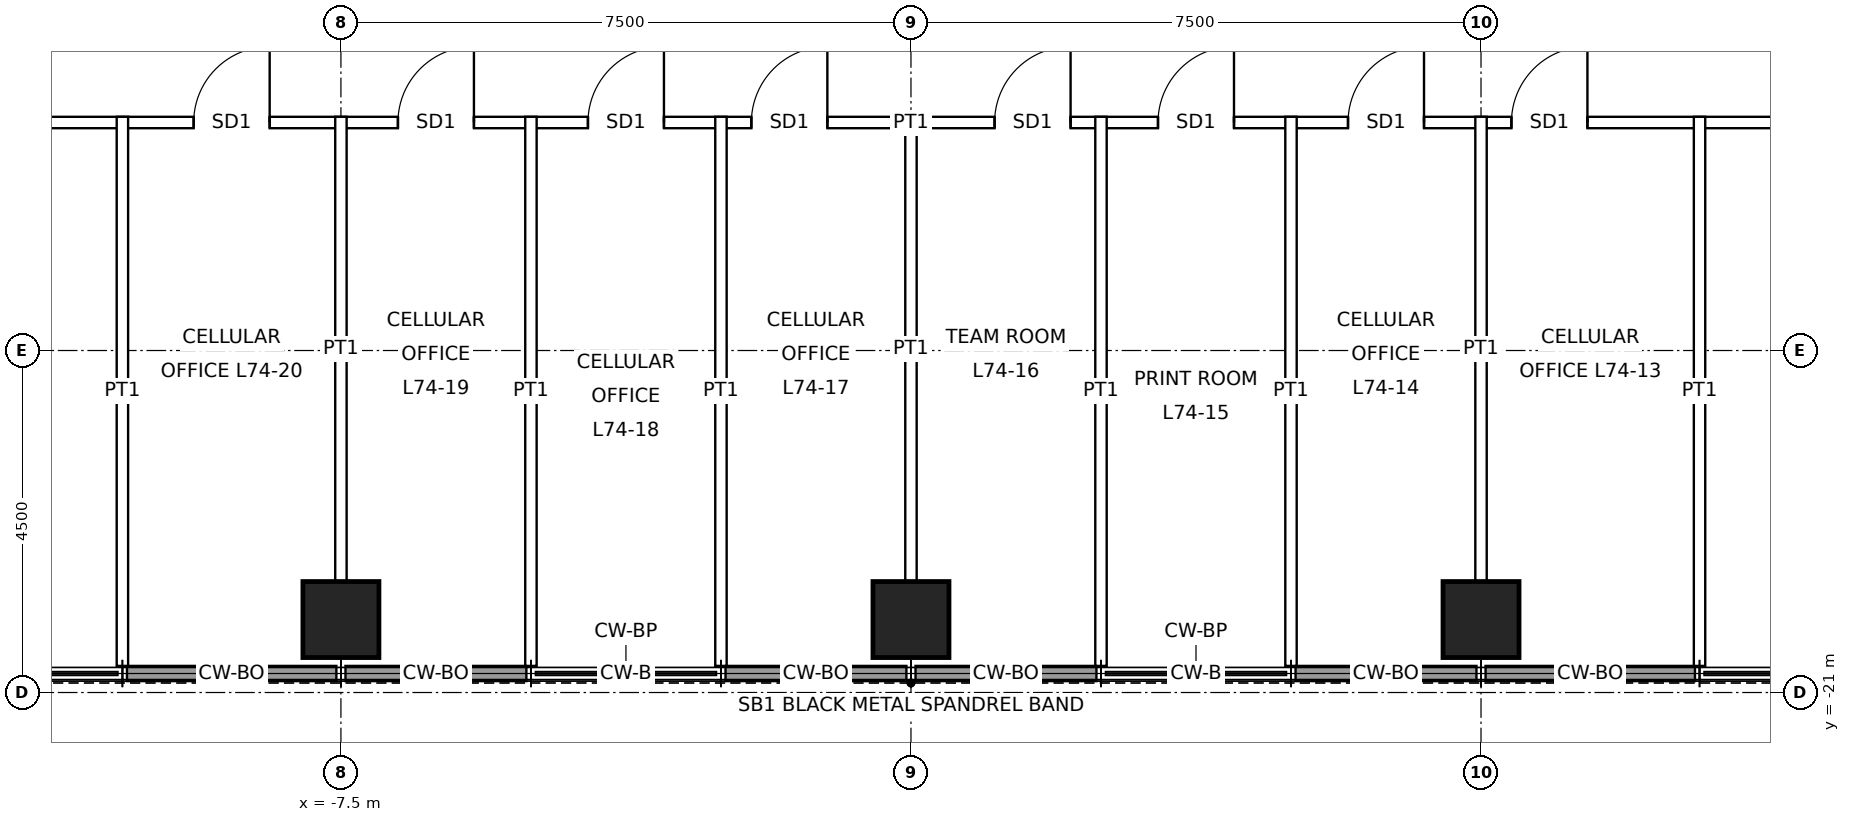
"""IFC4 building model, lengths in metres.
Left out: names, types, materials, properties, quantities, classifications, styles, units other than length and angle.
Written with IfcOpenShell. Run it as: python <this file> out.ifc"""

import sys

from ifc_helpers import new_model, si_unit, direction, frame, frame_2d, origin, origin_2d, place, context, subcontext, project, spatial, rectangle, hollow_rectangle, extrude, element, fill, save


model = new_model("IFC4")
c1 = context("Model", 3, precision=1e-05, world=origin(), true_north=direction((0.0, 1.0)))
c2 = subcontext(c1, "Body", "Model", "MODEL_VIEW")
j1 = project(units=[si_unit("LENGTHUNIT", "METRE"), si_unit("PLANEANGLEUNIT", "RADIAN")], contexts=[c1])
p1 = place(None, origin())
s1 = spatial("IfcSite", under=j1, at=p1, CompositionType="ELEMENT")
p2 = place(p1, origin())
s2 = spatial("IfcBuilding", under=s1, at=p2, CompositionType="ELEMENT")
p3 = place(p2, frame((0.0, 0.0, 331.9)))
s3 = spatial("IfcBuildingStorey", under=s2, at=p3, CompositionType="ELEMENT", Elevation=331.9)
for number, where, z_axis, x_axis in (
    (1, (7.5, -20.04, 0.0), (0.0, 0.0, 1.0), (1.0, 0.0, 0.0)),
    (2, (0.0, -20.04, 0.0), (0.0, 0.0, 1.0), (1.0, 0.0, 0.0)),
    (3, (-7.5, -20.04, 0.0), (0.0, 0.0, 1.0), (1.0, 0.0, 0.0)),
):
    element("IfcColumn", number, at=place(p3, frame(where, z_axis=z_axis, x_axis=x_axis)), inside=s3, PredefinedType="COLUMN", context=c2, shape_type="SweptSolid", body=[
        extrude(hollow_rectangle(XDim=1.0, YDim=1.0, WallThickness=0.075, at=origin_2d()), origin(), (0.0, 0.0, 1.0), 4.0),
    ])
p4 = place(p3, frame((10.315, -20.75, 0.0), z_axis=(0.0, 0.0, 1.0), x_axis=(-1.0, 0.0, 0.0)))
e4 = element("IfcWall", 4, at=p4, inside=s3, PredefinedType="SOLIDWALL", context=c2, shape_type="SweptSolid", body=[
    extrude(rectangle(XDim=2.755, YDim=0.2, at=frame_2d((1.377, 0.0))), origin(), (0.0, 0.0, 1.0), 3.8),
])
for number, where, z_axis, x_axis in (
    (5, (7.44, -20.75, 0.0), (0.0, 0.0, 1.0), (-1.0, 0.0, 0.0)),
    (6, (2.44, -20.75, 0.0), (0.0, 0.0, 1.0), (-1.0, 0.0, 0.0)),
    (7, (-0.06, -20.75, 0.0), (0.0, 0.0, 1.0), (-1.0, 0.0, 0.0)),
    (8, (-5.06, -20.75, 0.0), (0.0, 0.0, 1.0), (-1.0, 0.0, 0.0)),
):
    element("IfcWall", number, at=place(p3, frame(where, z_axis=z_axis, x_axis=x_axis)), inside=s3, PredefinedType="SOLIDWALL", context=c2, shape_type="SweptSolid", body=[
        extrude(rectangle(XDim=2.38, YDim=0.2, at=frame_2d((1.19, 0.0))), origin(), (0.0, 0.0, 1.0), 3.8),
    ])
p5 = place(p3, frame((-7.56, -20.75, 0.0), z_axis=(0.0, 0.0, 1.0), x_axis=(-1.0, 0.0, 0.0)))
e9 = element("IfcWall", 9, at=p5, inside=s3, PredefinedType="SOLIDWALL", context=c2, shape_type="SweptSolid", body=[
    extrude(rectangle(XDim=2.755, YDim=0.2, at=frame_2d((1.377, 0.0))), origin(), (0.0, 0.0, 1.0), 3.8),
])
p6 = place(p3, frame((-13.575, -13.5, 0.0), z_axis=(0.0, 0.0, 1.0), x_axis=(1.0, 0.0, 0.0)))
e10 = element("IfcWall", 10, at=p6, inside=s3, PredefinedType="PARTITIONING", context=c2, shape_type="SweptSolid", body=[
    extrude(rectangle(XDim=27.15, YDim=0.15, at=frame_2d((13.575, 0.0))), origin(), (0.0, 0.0, 1.0), 3.8),
])
p7 = place(p6, frame((21.475, 0.0, 0.0)))
e11 = element("IfcOpeningElement", 11, at=p7, cuts=e10, PredefinedType="OPENING", context=c2, shape_type="SweptSolid", body=[
    extrude(rectangle(XDim=1.0, YDim=2.4, at=frame_2d((0.5, 1.2))), frame((0.0, 0.085, 0.0), z_axis=(0.0, -1.0, 0.0), x_axis=(1.0, 0.0, 0.0)), (0.0, 0.0, 1.0), 0.17),
])
p8 = place(p6, frame((19.325, 0.0, 0.0)))
e12 = element("IfcOpeningElement", 12, at=p8, cuts=e10, PredefinedType="OPENING", context=c2, shape_type="SweptSolid", body=[
    extrude(rectangle(XDim=1.0, YDim=2.4, at=frame_2d((0.5, 1.2))), frame((0.0, 0.085, 0.0), z_axis=(0.0, -1.0, 0.0), x_axis=(1.0, 0.0, 0.0)), (0.0, 0.0, 1.0), 0.17),
])
p9 = place(p6, frame((16.825, 0.0, 0.0)))
e13 = element("IfcOpeningElement", 13, at=p9, cuts=e10, PredefinedType="OPENING", context=c2, shape_type="SweptSolid", body=[
    extrude(rectangle(XDim=1.0, YDim=2.4, at=frame_2d((0.5, 1.2))), frame((0.0, 0.085, 0.0), z_axis=(0.0, -1.0, 0.0), x_axis=(1.0, 0.0, 0.0)), (0.0, 0.0, 1.0), 0.17),
])
p10 = place(p6, frame((14.675, 0.0, 0.0)))
e14 = element("IfcOpeningElement", 14, at=p10, cuts=e10, PredefinedType="OPENING", context=c2, shape_type="SweptSolid", body=[
    extrude(rectangle(XDim=1.0, YDim=2.4, at=frame_2d((0.5, 1.2))), frame((0.0, 0.085, 0.0), z_axis=(0.0, -1.0, 0.0), x_axis=(1.0, 0.0, 0.0)), (0.0, 0.0, 1.0), 0.17),
])
p11 = place(p6, frame((11.475, 0.0, 0.0)))
e15 = element("IfcOpeningElement", 15, at=p11, cuts=e10, PredefinedType="OPENING", context=c2, shape_type="SweptSolid", body=[
    extrude(rectangle(XDim=1.0, YDim=2.4, at=frame_2d((0.5, 1.2))), frame((0.0, 0.085, 0.0), z_axis=(0.0, -1.0, 0.0), x_axis=(1.0, 0.0, 0.0)), (0.0, 0.0, 1.0), 0.17),
])
p12 = place(p6, frame((9.325, 0.0, 0.0)))
e16 = element("IfcOpeningElement", 16, at=p12, cuts=e10, PredefinedType="OPENING", context=c2, shape_type="SweptSolid", body=[
    extrude(rectangle(XDim=1.0, YDim=2.4, at=frame_2d((0.5, 1.2))), frame((0.0, 0.085, 0.0), z_axis=(0.0, -1.0, 0.0), x_axis=(1.0, 0.0, 0.0)), (0.0, 0.0, 1.0), 0.17),
])
p13 = place(p6, frame((6.825, 0.0, 0.0)))
e17 = element("IfcOpeningElement", 17, at=p13, cuts=e10, PredefinedType="OPENING", context=c2, shape_type="SweptSolid", body=[
    extrude(rectangle(XDim=1.0, YDim=2.4, at=frame_2d((0.5, 1.2))), frame((0.0, 0.085, 0.0), z_axis=(0.0, -1.0, 0.0), x_axis=(1.0, 0.0, 0.0)), (0.0, 0.0, 1.0), 0.17),
])
p14 = place(p6, frame((4.137, 0.0, 0.0)))
e18 = element("IfcOpeningElement", 18, at=p14, cuts=e10, PredefinedType="OPENING", context=c2, shape_type="SweptSolid", body=[
    extrude(rectangle(XDim=1.0, YDim=2.4, at=frame_2d((0.5, 1.2))), frame((0.0, 0.085, 0.0), z_axis=(0.0, -1.0, 0.0), x_axis=(1.0, 0.0, 0.0)), (0.0, 0.0, 1.0), 0.17),
])
p15 = place(p6, frame((25.278, 0.0, 0.0)))
e19 = element("IfcOpeningElement", 19, at=p15, cuts=e10, PredefinedType="OPENING", context=c2, shape_type="SweptSolid", body=[
    extrude(rectangle(XDim=1.0, YDim=2.4, at=frame_2d((0.5, 1.2))), frame((0.0, 0.085, 0.0), z_axis=(0.0, -1.0, 0.0), x_axis=(1.0, 0.0, 0.0)), (0.0, 0.0, 1.0), 0.17),
])
p16 = place(p6, frame((1.137, 0.0, 0.0)))
e20 = element("IfcOpeningElement", 20, at=p16, cuts=e10, PredefinedType="OPENING", context=c2, shape_type="SweptSolid", body=[
    extrude(rectangle(XDim=1.0, YDim=2.4, at=frame_2d((0.5, 1.2))), frame((0.0, 0.085, 0.0), z_axis=(0.0, -1.0, 0.0), x_axis=(1.0, 0.0, 0.0)), (0.0, 0.0, 1.0), 0.17),
])
p17 = place(p3, frame((-10.375, -20.65, 0.0), z_axis=(0.0, 0.0, 1.0), x_axis=(0.0, 1.0, 0.0)))
e21 = element("IfcWall", 21, at=p17, inside=s3, PredefinedType="PARTITIONING", context=c2, shape_type="SweptSolid", body=[
    extrude(rectangle(XDim=7.225, YDim=0.15, at=frame_2d((3.612, 0.0))), origin(), (0.0, 0.0, 1.0), 3.8),
])
p18 = place(p3, frame((-7.5, -19.54, 0.0), z_axis=(0.0, 0.0, 1.0), x_axis=(0.0, 1.0, 0.0)))
e22 = element("IfcWall", 22, at=p18, inside=s3, PredefinedType="PARTITIONING", context=c2, shape_type="SweptSolid", body=[
    extrude(rectangle(XDim=6.115, YDim=0.15, at=frame_2d((3.058, 0.0))), origin(), (0.0, 0.0, 1.0), 2.769),
])
for number, where, z_axis, x_axis in (
    (23, (-5.0, -20.65, 0.0), (0.0, 0.0, 1.0), (0.0, 1.0, 0.0)),
    (24, (-2.5, -20.65, 0.0), (0.0, 0.0, 1.0), (0.0, 1.0, 0.0)),
):
    element("IfcWall", number, at=place(p3, frame(where, z_axis=z_axis, x_axis=x_axis)), inside=s3, PredefinedType="PARTITIONING", context=c2, shape_type="SweptSolid", body=[
        extrude(rectangle(XDim=7.225, YDim=0.15, at=frame_2d((3.612, 0.0))), origin(), (0.0, 0.0, 1.0), 3.8),
    ])
p19 = place(p3, frame((0.0, -19.54, 0.0), z_axis=(0.0, 0.0, 1.0), x_axis=(0.0, 1.0, 0.0)))
e25 = element("IfcWall", 25, at=p19, inside=s3, PredefinedType="PARTITIONING", context=c2, shape_type="SweptSolid", body=[
    extrude(rectangle(XDim=6.115, YDim=0.15, at=frame_2d((3.058, 0.0))), origin(), (0.0, 0.0, 1.0), 2.769),
])
for number, where, z_axis, x_axis in (
    (26, (2.5, -20.65, 0.0), (0.0, 0.0, 1.0), (0.0, 1.0, 0.0)),
    (27, (5.0, -20.65, 0.0), (0.0, 0.0, 1.0), (0.0, 1.0, 0.0)),
):
    element("IfcWall", number, at=place(p3, frame(where, z_axis=z_axis, x_axis=x_axis)), inside=s3, PredefinedType="PARTITIONING", context=c2, shape_type="SweptSolid", body=[
        extrude(rectangle(XDim=7.225, YDim=0.15, at=frame_2d((3.612, 0.0))), origin(), (0.0, 0.0, 1.0), 3.8),
    ])
p20 = place(p3, frame((7.5, -19.54, 0.0), z_axis=(0.0, 0.0, 1.0), x_axis=(0.0, 1.0, 0.0)))
e28 = element("IfcWall", 28, at=p20, inside=s3, PredefinedType="PARTITIONING", context=c2, shape_type="SweptSolid", body=[
    extrude(rectangle(XDim=6.115, YDim=0.15, at=frame_2d((3.058, 0.0))), origin(), (0.0, 0.0, 1.0), 2.769),
])
p21 = place(p3, frame((10.375, -20.65, 0.0), z_axis=(0.0, 0.0, 1.0), x_axis=(0.0, 1.0, 0.0)))
e29 = element("IfcWall", 29, at=p21, inside=s3, PredefinedType="PARTITIONING", context=c2, shape_type="SweptSolid", body=[
    extrude(rectangle(XDim=7.225, YDim=0.15, at=frame_2d((3.612, 0.0))), origin(), (0.0, 0.0, 1.0), 3.8),
])
p22 = place(p7, origin())
e30 = element("IfcDoor", 30, at=p22, inside=s3, OperationType="SINGLE_SWING_RIGHT", PredefinedType="DOOR", context=c2, shape_type="SweptSolid", body=[
    extrude(rectangle(XDim=1.0, YDim=2.4, at=frame_2d((0.5, 1.2))), frame((0.0, 0.025, 0.0), z_axis=(0.0, -1.0, 0.0), x_axis=(1.0, 0.0, 0.0)), (0.0, 0.0, 1.0), 0.05),
])
fill(e11, e30)
p23 = place(p8, origin())
e31 = element("IfcDoor", 31, at=p23, inside=s3, OperationType="SINGLE_SWING_RIGHT", PredefinedType="DOOR", context=c2, shape_type="SweptSolid", body=[
    extrude(rectangle(XDim=1.0, YDim=2.4, at=frame_2d((0.5, 1.2))), frame((0.0, 0.025, 0.0), z_axis=(0.0, -1.0, 0.0), x_axis=(1.0, 0.0, 0.0)), (0.0, 0.0, 1.0), 0.05),
])
fill(e12, e31)
p24 = place(p9, origin())
e32 = element("IfcDoor", 32, at=p24, inside=s3, OperationType="SINGLE_SWING_RIGHT", PredefinedType="DOOR", context=c2, shape_type="SweptSolid", body=[
    extrude(rectangle(XDim=1.0, YDim=2.4, at=frame_2d((0.5, 1.2))), frame((0.0, 0.025, 0.0), z_axis=(0.0, -1.0, 0.0), x_axis=(1.0, 0.0, 0.0)), (0.0, 0.0, 1.0), 0.05),
])
fill(e13, e32)
p25 = place(p10, origin())
e33 = element("IfcDoor", 33, at=p25, inside=s3, OperationType="SINGLE_SWING_RIGHT", PredefinedType="DOOR", context=c2, shape_type="SweptSolid", body=[
    extrude(rectangle(XDim=1.0, YDim=2.4, at=frame_2d((0.5, 1.2))), frame((0.0, 0.025, 0.0), z_axis=(0.0, -1.0, 0.0), x_axis=(1.0, 0.0, 0.0)), (0.0, 0.0, 1.0), 0.05),
])
fill(e14, e33)
p26 = place(p11, origin())
e34 = element("IfcDoor", 34, at=p26, inside=s3, OperationType="SINGLE_SWING_RIGHT", PredefinedType="DOOR", context=c2, shape_type="SweptSolid", body=[
    extrude(rectangle(XDim=1.0, YDim=2.4, at=frame_2d((0.5, 1.2))), frame((0.0, 0.025, 0.0), z_axis=(0.0, -1.0, 0.0), x_axis=(1.0, 0.0, 0.0)), (0.0, 0.0, 1.0), 0.05),
])
fill(e15, e34)
p27 = place(p12, origin())
e35 = element("IfcDoor", 35, at=p27, inside=s3, OperationType="SINGLE_SWING_RIGHT", PredefinedType="DOOR", context=c2, shape_type="SweptSolid", body=[
    extrude(rectangle(XDim=1.0, YDim=2.4, at=frame_2d((0.5, 1.2))), frame((0.0, 0.025, 0.0), z_axis=(0.0, -1.0, 0.0), x_axis=(1.0, 0.0, 0.0)), (0.0, 0.0, 1.0), 0.05),
])
fill(e16, e35)
p28 = place(p13, origin())
e36 = element("IfcDoor", 36, at=p28, inside=s3, OperationType="SINGLE_SWING_RIGHT", PredefinedType="DOOR", context=c2, shape_type="SweptSolid", body=[
    extrude(rectangle(XDim=1.0, YDim=2.4, at=frame_2d((0.5, 1.2))), frame((0.0, 0.025, 0.0), z_axis=(0.0, -1.0, 0.0), x_axis=(1.0, 0.0, 0.0)), (0.0, 0.0, 1.0), 0.05),
])
fill(e17, e36)
p29 = place(p14, origin())
e37 = element("IfcDoor", 37, at=p29, inside=s3, OperationType="SINGLE_SWING_RIGHT", PredefinedType="DOOR", context=c2, shape_type="SweptSolid", body=[
    extrude(rectangle(XDim=1.0, YDim=2.4, at=frame_2d((0.5, 1.2))), frame((0.0, 0.025, 0.0), z_axis=(0.0, -1.0, 0.0), x_axis=(1.0, 0.0, 0.0)), (0.0, 0.0, 1.0), 0.05),
])
fill(e18, e37)
save(model, sys.argv[1])
